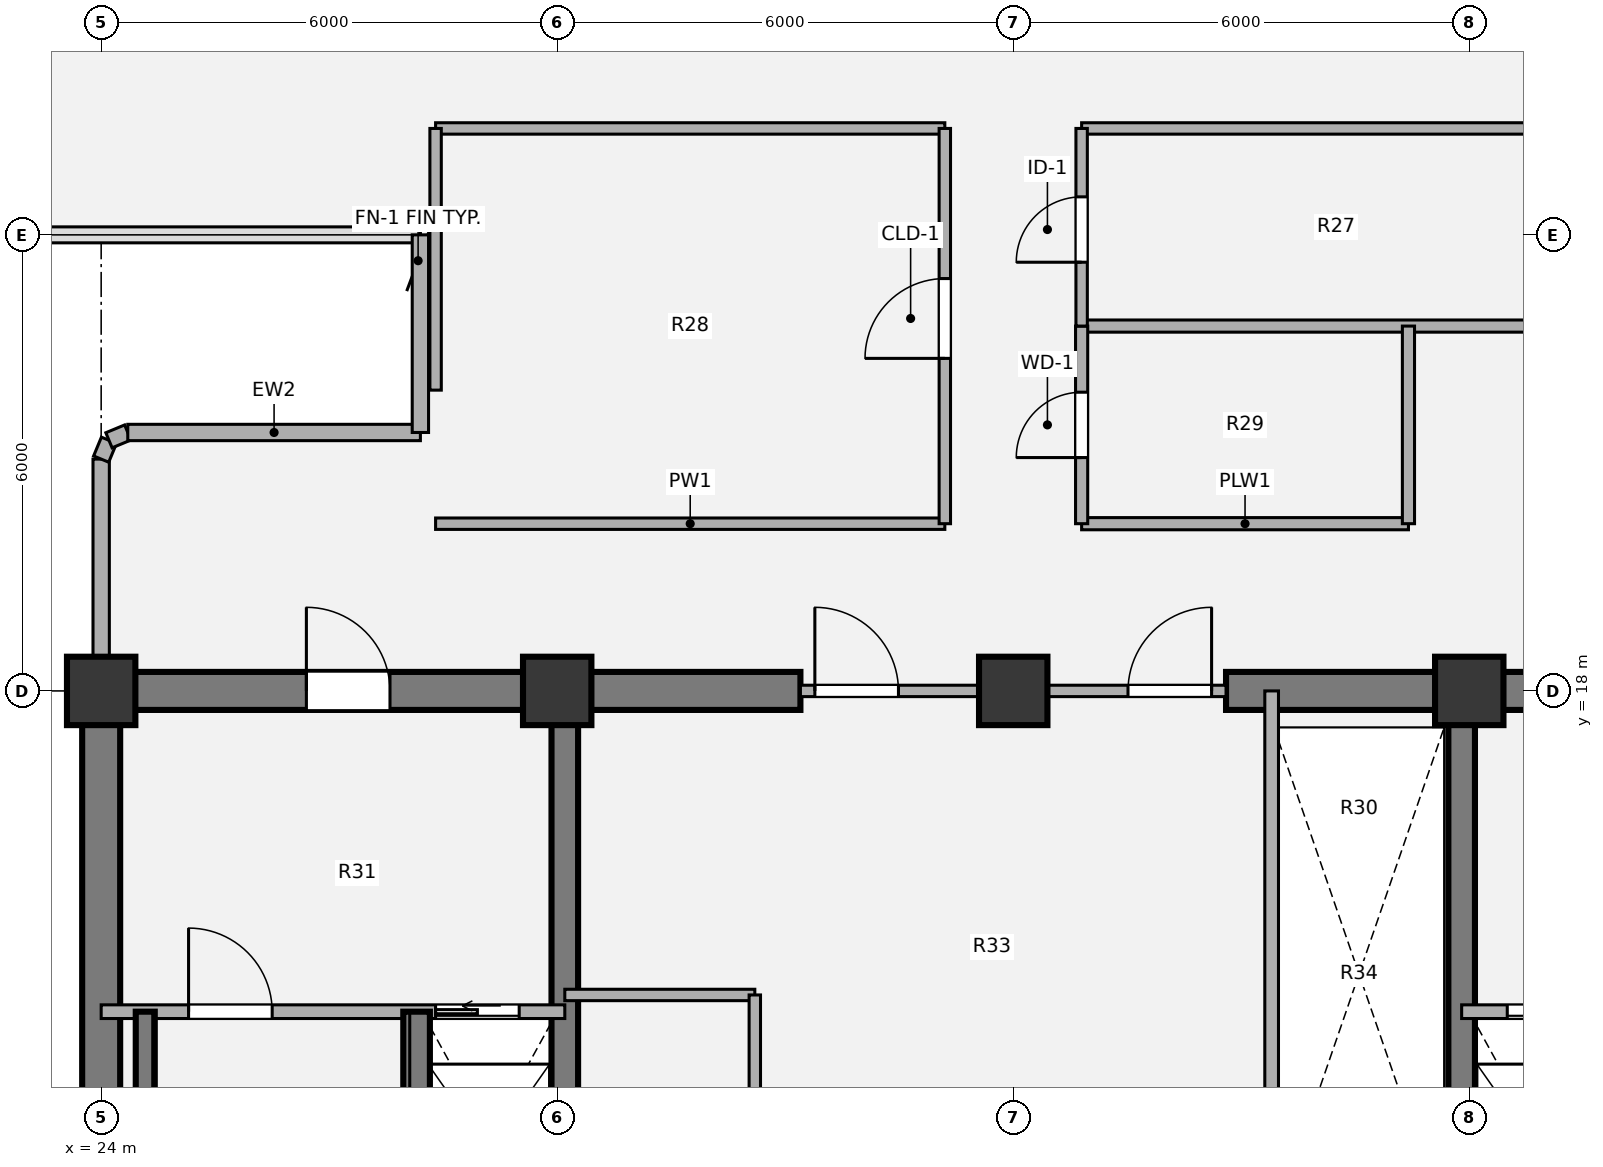
"""IFC4 building model, lengths in metres.
Left out: names, types, materials, properties, quantities, classifications, styles, units other than length and angle.
Written with IfcOpenShell. Run it as: python <this file> out.ifc"""

import sys

from ifc_helpers import new_model, si_unit, direction, frame, frame_2d, origin, origin_2d, place, context, subcontext, project, spatial, rectangle, extrude, source, transform, mapped, element, fill, save


model = new_model("IFC4")
c1 = context("Model", 3, precision=1e-05, world=origin(), true_north=direction((0.0, 1.0)))
c2 = subcontext(c1, "Body", "Model", "MODEL_VIEW")
j1 = project(units=[si_unit("LENGTHUNIT", "METRE"), si_unit("PLANEANGLEUNIT", "RADIAN")], contexts=[c1])
p1 = place(None, origin())
s1 = spatial("IfcSite", under=j1, at=p1, CompositionType="ELEMENT")
p2 = place(p1, origin())
s2 = spatial("IfcBuilding", under=s1, at=p2, CompositionType="ELEMENT")
p3 = place(p2, frame((0.0, 0.0, 131.4)))
s3 = spatial("IfcBuildingStorey", under=s2, at=p3, CompositionType="ELEMENT", Elevation=131.4)
m1 = source(origin(), c2, "Body", "SweptSolid", [
    extrude(rectangle(XDim=0.9, YDim=0.9, at=origin_2d()), origin(), (0.0, 0.0, 1.0), 3.78),
])
for number, where, z_axis, x_axis in (
    (1, (24.0, 18.0, 0.0), (0.0, 0.0, 1.0), (1.0, 0.0, 0.0)),
    (2, (30.0, 18.0, 0.0), (0.0, 0.0, 1.0), (1.0, 0.0, 0.0)),
    (3, (36.0, 18.0, 0.0), (0.0, 0.0, 1.0), (1.0, 0.0, 0.0)),
    (4, (42.0, 18.0, 0.0), (0.0, 0.0, 1.0), (1.0, 0.0, 0.0)),
):
    element("IfcColumn", number, at=place(p3, frame(where, z_axis=z_axis, x_axis=x_axis)), inside=s3, PredefinedType="COLUMN", context=c2, shape_type="MappedRepresentation", body=[
        mapped(m1, transform((0.0, 0.0, 0.0), x_axis=(1.0, 0.0, 0.0), y_axis=(0.0, 1.0, 0.0), z_axis=(0.0, 0.0, 1.0), scale=1.0)),
    ])
p4 = place(p3, frame((24.0, 6.0, 0.0), z_axis=(0.0, 0.0, 1.0), x_axis=(0.0, 1.0, 0.0)))
e5 = element("IfcWall", 5, at=p4, inside=s3, PredefinedType="SHEAR", context=c2, shape_type="SweptSolid", body=[
    extrude(rectangle(XDim=12.0, YDim=0.5, at=frame_2d((6.0, 0.0))), origin(), (0.0, 0.0, 1.0), 3.78),
])
p5 = place(p3, frame((23.75, 18.0, 0.0), z_axis=(0.0, 0.0, 1.0), x_axis=(1.0, 0.0, 0.0)))
e6 = element("IfcWall", 6, at=p5, inside=s3, PredefinedType="SHEAR", context=c2, shape_type="SweptSolid", body=[
    extrude(rectangle(XDim=9.45, YDim=0.5, at=frame_2d((4.725, 0.0))), origin(), (0.0, 0.0, 1.0), 3.78),
])
p6 = place(p5, frame((2.95, 0.0, 0.0)))
e7 = element("IfcOpeningElement", 7, at=p6, cuts=e6, PredefinedType="OPENING", context=c2, shape_type="SweptSolid", body=[
    extrude(rectangle(XDim=1.1, YDim=2.1, at=origin_2d()), frame((0.55, 0.26, 1.05), z_axis=(0.0, -1.0, 0.0), x_axis=(1.0, 0.0, 0.0)), (0.0, 0.0, 1.0), 0.52),
])
p7 = place(p3, frame((38.8, 18.0, 0.0), z_axis=(0.0, 0.0, 1.0), x_axis=(1.0, 0.0, 0.0)))
e8 = element("IfcWall", 8, at=p7, inside=s3, PredefinedType="SHEAR", context=c2, shape_type="SweptSolid", body=[
    extrude(rectangle(XDim=9.45, YDim=0.5, at=frame_2d((4.725, 0.0))), origin(), (0.0, 0.0, 1.0), 3.78),
])
p8 = place(p7, frame((5.45, 0.0, 0.0)))
e9 = element("IfcOpeningElement", 9, at=p8, cuts=e8, PredefinedType="OPENING", context=c2, shape_type="SweptSolid", body=[
    extrude(rectangle(XDim=1.1, YDim=2.1, at=origin_2d()), frame((0.55, 0.26, 1.05), z_axis=(0.0, -1.0, 0.0), x_axis=(1.0, 0.0, 0.0)), (0.0, 0.0, 1.0), 0.52),
])
p9 = place(p3, frame((30.1, 6.0, 0.0), z_axis=(0.0, 0.0, 1.0), x_axis=(0.0, 1.0, 0.0)))
e10 = element("IfcWall", 10, at=p9, inside=s3, PredefinedType="SHEAR", context=c2, shape_type="SweptSolid", body=[
    extrude(rectangle(XDim=12.0, YDim=0.35, at=frame_2d((6.0, 0.0))), origin(), (0.0, 0.0, 1.0), 3.78),
])
p10 = place(p3, frame((41.9, 18.0, 0.0), z_axis=(0.0, 0.0, 1.0), x_axis=(0.0, -1.0, 0.0)))
e11 = element("IfcWall", 11, at=p10, inside=s3, PredefinedType="SHEAR", context=c2, shape_type="SweptSolid", body=[
    extrude(rectangle(XDim=12.0, YDim=0.35, at=frame_2d((6.0, 0.0))), origin(), (0.0, 0.0, 1.0), 3.78),
])
p11 = place(p10, frame((10.08, 0.0, 0.0)))
e12 = element("IfcOpeningElement", 12, at=p11, cuts=e11, PredefinedType="OPENING", context=c2, shape_type="SweptSolid", body=[
    extrude(rectangle(XDim=1.3, YDim=2.1, at=origin_2d()), frame((0.65, 0.185, 1.05), z_axis=(0.0, -1.0, 0.0), x_axis=(1.0, 0.0, 0.0)), (0.0, 0.0, 1.0), 0.37),
])
p12 = place(p3, frame((24.0, 18.43, 0.0), z_axis=(0.0, 0.0, 1.0), x_axis=(0.0, 1.0, 0.0)))
e13 = element("IfcWall", 13, at=p12, inside=s3, PredefinedType="SOLIDWALL", context=c2, shape_type="SweptSolid", body=[
    extrude(rectangle(XDim=2.62, YDim=0.215, at=frame_2d((1.31, 0.0))), origin(), (0.0, 0.0, 1.0), 3.53),
])
p13 = place(p3, frame((24.0, 21.05, 0.0), z_axis=(0.0, 0.0, 1.0), x_axis=(0.382673670509, 0.923883575944, 0.0)))
e14 = element("IfcWall", 14, at=p13, inside=s3, PredefinedType="SOLIDWALL", context=c2, shape_type="SweptSolid", body=[
    extrude(rectangle(XDim=0.268, YDim=0.215, at=frame_2d((0.134, 0.0))), origin(), (0.0, 0.0, 1.0), 3.53),
])
p14 = place(p3, frame((24.103, 21.298, 0.0), z_axis=(0.0, 0.0, 1.0), x_axis=(0.924205486139, 0.381895560841, 0.0)))
e15 = element("IfcWall", 15, at=p14, inside=s3, PredefinedType="SOLIDWALL", context=c2, shape_type="SweptSolid", body=[
    extrude(rectangle(XDim=0.268, YDim=0.215, at=frame_2d((0.134, 0.0))), origin(), (0.0, 0.0, 1.0), 3.53),
])
p15 = place(p3, frame((24.35, 21.4, 0.0), z_axis=(0.0, 0.0, 1.0), x_axis=(1.0, 0.0, 0.0)))
e16 = element("IfcWall", 16, at=p15, inside=s3, PredefinedType="SOLIDWALL", context=c2, shape_type="SweptSolid", body=[
    extrude(rectangle(XDim=3.85, YDim=0.215, at=frame_2d((1.925, 0.0))), origin(), (0.0, 0.0, 1.0), 3.53),
])
p16 = place(p3, frame((28.2, 21.4, 0.0), z_axis=(0.0, 0.0, 1.0), x_axis=(0.0, 1.0, 0.0)))
e17 = element("IfcWall", 17, at=p16, inside=s3, PredefinedType="SOLIDWALL", context=c2, shape_type="SweptSolid", body=[
    extrude(rectangle(XDim=2.6, YDim=0.215, at=frame_2d((1.3, 0.0))), origin(), (0.0, 0.0, 1.0), 3.53),
])
p17 = place(p3, frame((30.1, 14.0, 0.0), z_axis=(0.0, 0.0, 1.0), x_axis=(1.0, 0.0, 0.0)))
e18 = element("IfcWall", 18, at=p17, inside=s3, PredefinedType="PARTITIONING", context=c2, shape_type="SweptSolid", body=[
    extrude(rectangle(XDim=2.5, YDim=0.15, at=frame_2d((1.25, 0.0))), origin(), (0.0, 0.0, 1.0), 3.5),
])
p18 = place(p3, frame((39.4, 11.0, 0.0), z_axis=(0.0, 0.0, 1.0), x_axis=(0.0, 1.0, 0.0)))
e19 = element("IfcWall", 19, at=p18, inside=s3, PredefinedType="PARTITIONING", context=c2, shape_type="SweptSolid", body=[
    extrude(rectangle(XDim=7.0, YDim=0.18, at=frame_2d((3.5, 0.0))), origin(), (0.0, 0.0, 1.0), 3.5),
])
p19 = place(p3, frame((32.6, 6.0, 0.0), z_axis=(0.0, 0.0, 1.0), x_axis=(0.0, 1.0, 0.0)))
e20 = element("IfcWall", 20, at=p19, inside=s3, PredefinedType="PARTITIONING", context=c2, shape_type="SweptSolid", body=[
    extrude(rectangle(XDim=8.0, YDim=0.15, at=frame_2d((4.0, 0.0))), origin(), (0.0, 0.0, 1.0), 3.5),
])
p20 = place(p19, frame((1.5, 0.0, 0.0)))
e21 = element("IfcOpeningElement", 21, at=p20, cuts=e20, PredefinedType="OPENING", context=c2, shape_type="SweptSolid", body=[
    extrude(rectangle(XDim=0.86, YDim=2.1, at=origin_2d()), frame((0.43, 0.085, 1.05), z_axis=(0.0, -1.0, 0.0), x_axis=(1.0, 0.0, 0.0)), (0.0, 0.0, 1.0), 0.17),
])
p21 = place(p19, frame((5.6, 0.0, 0.0)))
e22 = element("IfcOpeningElement", 22, at=p21, cuts=e20, PredefinedType="OPENING", context=c2, shape_type="SweptSolid", body=[
    extrude(rectangle(XDim=0.86, YDim=2.1, at=origin_2d()), frame((0.43, 0.085, 1.05), z_axis=(0.0, -1.0, 0.0), x_axis=(1.0, 0.0, 0.0)), (0.0, 0.0, 1.0), 0.17),
])
p22 = place(p3, frame((33.2, 18.0, 0.0), z_axis=(0.0, 0.0, 1.0), x_axis=(1.0, 0.0, 0.0)))
e23 = element("IfcWall", 23, at=p22, inside=s3, PredefinedType="PARTITIONING", context=c2, shape_type="SweptSolid", body=[
    extrude(rectangle(XDim=5.6, YDim=0.15, at=frame_2d((2.8, 0.0))), origin(), (0.0, 0.0, 1.0), 2.315),
])
p23 = place(p22, frame((0.19, 0.0, 0.0)))
e24 = element("IfcOpeningElement", 24, at=p23, cuts=e23, PredefinedType="OPENING", context=c2, shape_type="SweptSolid", body=[
    extrude(rectangle(XDim=1.1, YDim=2.1, at=origin_2d()), frame((0.55, 0.085, 1.05), z_axis=(0.0, -1.0, 0.0), x_axis=(1.0, 0.0, 0.0)), (0.0, 0.0, 1.0), 0.17),
])
p24 = place(p22, frame((4.31, 0.0, 0.0)))
e25 = element("IfcOpeningElement", 25, at=p24, cuts=e23, PredefinedType="OPENING", context=c2, shape_type="SweptSolid", body=[
    extrude(rectangle(XDim=1.1, YDim=2.1, at=origin_2d()), frame((0.55, 0.085, 1.05), z_axis=(0.0, -1.0, 0.0), x_axis=(1.0, 0.0, 0.0)), (0.0, 0.0, 1.0), 0.17),
])
p25 = place(p3, frame((24.0, 13.78, 0.0), z_axis=(0.0, 0.0, 1.0), x_axis=(1.0, 0.0, 0.0)))
e26 = element("IfcWall", 26, at=p25, inside=s3, PredefinedType="PARTITIONING", context=c2, shape_type="SweptSolid", body=[
    extrude(rectangle(XDim=6.1, YDim=0.18, at=frame_2d((3.05, 0.0))), origin(), (0.0, 0.0, 1.0), 3.5),
])
p26 = place(p25, frame((1.15, 0.0, 0.0)))
e27 = element("IfcOpeningElement", 27, at=p26, cuts=e26, PredefinedType="OPENING", context=c2, shape_type="SweptSolid", body=[
    extrude(rectangle(XDim=1.1, YDim=2.1, at=origin_2d()), frame((0.55, 0.1, 1.05), z_axis=(0.0, -1.0, 0.0), x_axis=(1.0, 0.0, 0.0)), (0.0, 0.0, 1.0), 0.2),
])
p27 = place(p25, frame((4.4, 0.0, 0.0)))
e28 = element("IfcOpeningElement", 28, at=p27, cuts=e26, PredefinedType="OPENING", context=c2, shape_type="SweptSolid", body=[
    extrude(rectangle(XDim=1.1, YDim=2.1, at=origin_2d()), frame((0.55, 0.1, 1.05), z_axis=(0.0, -1.0, 0.0), x_axis=(1.0, 0.0, 0.0)), (0.0, 0.0, 1.0), 0.2),
])
p28 = place(p3, frame((28.15, 6.0, 0.0), z_axis=(0.0, 0.0, 1.0), x_axis=(0.0, 1.0, 0.0)))
e29 = element("IfcWall", 29, at=p28, inside=s3, PredefinedType="SHEAR", context=c2, shape_type="SweptSolid", body=[
    extrude(rectangle(XDim=7.78, YDim=0.35, at=frame_2d((3.89, 0.0))), origin(), (0.0, 0.0, 1.0), 3.85),
])
p29 = place(p3, frame((24.58, 6.0, 0.0), z_axis=(0.0, 0.0, 1.0), x_axis=(0.0, 1.0, 0.0)))
e30 = element("IfcWall", 30, at=p29, inside=s3, PredefinedType="SHEAR", context=c2, shape_type="SweptSolid", body=[
    extrude(rectangle(XDim=7.78, YDim=0.25, at=frame_2d((3.89, 0.0))), origin(), (0.0, 0.0, 1.0), 3.85),
])
p30 = place(p3, frame((41.9, 13.78, 0.0), z_axis=(0.0, 0.0, 1.0), x_axis=(1.0, 0.0, 0.0)))
e31 = element("IfcWall", 31, at=p30, inside=s3, PredefinedType="PARTITIONING", context=c2, shape_type="SweptSolid", body=[
    extrude(rectangle(XDim=6.1, YDim=0.18, at=frame_2d((3.05, 0.0))), origin(), (0.0, 0.0, 1.0), 3.5),
])
p31 = place(p30, frame((0.6, 0.0, 0.0)))
e32 = element("IfcOpeningElement", 32, at=p31, cuts=e31, PredefinedType="OPENING", context=c2, shape_type="SweptSolid", body=[
    extrude(rectangle(XDim=1.1, YDim=2.1, at=origin_2d()), frame((0.55, 0.1, 1.05), z_axis=(0.0, -1.0, 0.0), x_axis=(1.0, 0.0, 0.0)), (0.0, 0.0, 1.0), 0.2),
])
p32 = place(p30, frame((3.8, 0.0, 0.0)))
e33 = element("IfcOpeningElement", 33, at=p32, cuts=e31, PredefinedType="OPENING", context=c2, shape_type="SweptSolid", body=[
    extrude(rectangle(XDim=1.1, YDim=2.1, at=origin_2d()), frame((0.55, 0.1, 1.05), z_axis=(0.0, -1.0, 0.0), x_axis=(1.0, 0.0, 0.0)), (0.0, 0.0, 1.0), 0.2),
])
p33 = place(p3, frame((28.4, 20.2, 0.0), z_axis=(0.0, 0.0, 1.0), x_axis=(1.0, 0.0, 0.0)))
e34 = element("IfcWall", 34, at=p33, inside=s3, PredefinedType="PARTITIONING", context=c2, shape_type="SweptSolid", body=[
    extrude(rectangle(XDim=6.7, YDim=0.15, at=frame_2d((3.35, 0.0))), origin(), (0.0, 0.0, 1.0), 3.5),
])
p34 = place(p3, frame((36.9, 20.2, 0.0), z_axis=(0.0, 0.0, 1.0), x_axis=(1.0, 0.0, 0.0)))
e35 = element("IfcWall", 35, at=p34, inside=s3, PredefinedType="PLUMBINGWALL", context=c2, shape_type="SweptSolid", body=[
    extrude(rectangle(XDim=4.3, YDim=0.16, at=frame_2d((2.15, 0.0))), origin(), (0.0, 0.0, 1.0), 3.5),
])
p35 = place(p3, frame((36.9, 22.8, 0.0), z_axis=(0.0, 0.0, 1.0), x_axis=(1.0, 0.0, 0.0)))
e36 = element("IfcWall", 36, at=p35, inside=s3, PredefinedType="PLUMBINGWALL", context=c2, shape_type="SweptSolid", body=[
    extrude(rectangle(XDim=6.82, YDim=0.16, at=frame_2d((3.41, 0.0))), origin(), (0.0, 0.0, 1.0), 3.5),
])
for number, where, z_axis, x_axis in (
    (37, (28.4, 25.4, 0.0), (0.0, 0.0, 1.0), (1.0, 0.0, 0.0)),
    (38, (36.9, 25.4, 0.0), (0.0, 0.0, 1.0), (1.0, 0.0, 0.0)),
):
    element("IfcWall", number, at=place(p3, frame(where, z_axis=z_axis, x_axis=x_axis)), inside=s3, PredefinedType="PARTITIONING", context=c2, shape_type="SweptSolid", body=[
        extrude(rectangle(XDim=6.7, YDim=0.15, at=frame_2d((3.35, 0.0))), origin(), (0.0, 0.0, 1.0), 3.5),
    ])
p36 = place(p3, frame((28.4, 21.957, 0.0), z_axis=(0.0, 0.0, 1.0), x_axis=(0.0, 1.0, 0.0)))
e39 = element("IfcWall", 39, at=p36, inside=s3, PredefinedType="PARTITIONING", context=c2, shape_type="SweptSolid", body=[
    extrude(rectangle(XDim=3.443, YDim=0.15, at=frame_2d((1.721, 0.0))), origin(), (0.0, 0.0, 1.0), 3.5),
])
p37 = place(p3, frame((35.1, 20.2, 0.0), z_axis=(0.0, 0.0, 1.0), x_axis=(0.0, 1.0, 0.0)))
e40 = element("IfcWall", 40, at=p37, inside=s3, PredefinedType="PARTITIONING", context=c2, shape_type="SweptSolid", body=[
    extrude(rectangle(XDim=5.2, YDim=0.15, at=frame_2d((2.6, 0.0))), origin(), (0.0, 0.0, 1.0), 3.5),
])
p38 = place(p37, frame((2.175, 0.0, 0.0)))
e41 = element("IfcOpeningElement", 41, at=p38, cuts=e40, PredefinedType="OPENING", context=c2, shape_type="SweptSolid", body=[
    extrude(rectangle(XDim=1.05, YDim=2.1, at=origin_2d()), frame((0.525, 0.085, 1.05), z_axis=(0.0, -1.0, 0.0), x_axis=(1.0, 0.0, 0.0)), (0.0, 0.0, 1.0), 0.17),
])
p39 = place(p3, frame((36.9, 20.2, 0.0), z_axis=(0.0, 0.0, 1.0), x_axis=(0.0, 1.0, 0.0)))
e42 = element("IfcWall", 42, at=p39, inside=s3, PredefinedType="PLUMBINGWALL", context=c2, shape_type="SweptSolid", body=[
    extrude(rectangle(XDim=2.6, YDim=0.16, at=frame_2d((1.3, 0.0))), origin(), (0.0, 0.0, 1.0), 3.5),
])
p40 = place(p39, frame((0.87, 0.0, 0.0)))
e43 = element("IfcOpeningElement", 43, at=p40, cuts=e42, PredefinedType="OPENING", context=c2, shape_type="SweptSolid", body=[
    extrude(rectangle(XDim=0.86, YDim=2.1, at=origin_2d()), frame((0.43, 0.09, 1.05), z_axis=(0.0, -1.0, 0.0), x_axis=(1.0, 0.0, 0.0)), (0.0, 0.0, 1.0), 0.18),
])
p41 = place(p3, frame((36.9, 22.8, 0.0), z_axis=(0.0, 0.0, 1.0), x_axis=(0.0, 1.0, 0.0)))
e44 = element("IfcWall", 44, at=p41, inside=s3, PredefinedType="PARTITIONING", context=c2, shape_type="SweptSolid", body=[
    extrude(rectangle(XDim=2.6, YDim=0.15, at=frame_2d((1.3, 0.0))), origin(), (0.0, 0.0, 1.0), 3.5),
])
p42 = place(p41, frame((0.84, 0.0, 0.0)))
e45 = element("IfcOpeningElement", 45, at=p42, cuts=e44, PredefinedType="OPENING", context=c2, shape_type="SweptSolid", body=[
    extrude(rectangle(XDim=0.86, YDim=2.1, at=origin_2d()), frame((0.43, 0.085, 1.05), z_axis=(0.0, -1.0, 0.0), x_axis=(1.0, 0.0, 0.0)), (0.0, 0.0, 1.0), 0.17),
])
p43 = place(p3, frame((41.2, 20.2, 0.0), z_axis=(0.0, 0.0, 1.0), x_axis=(0.0, 1.0, 0.0)))
e46 = element("IfcWall", 46, at=p43, inside=s3, PredefinedType="PLUMBINGWALL", context=c2, shape_type="SweptSolid", body=[
    extrude(rectangle(XDim=2.6, YDim=0.16, at=frame_2d((1.3, 0.0))), origin(), (0.0, 0.0, 1.0), 2.815),
])
m2 = source(origin(), c2, "Body", "SweptSolid", [
    extrude(rectangle(XDim=1.1, YDim=2.1, at=origin_2d()), frame((0.55, 0.025, 1.05), z_axis=(0.0, -1.0, 0.0), x_axis=(1.0, 0.0, 0.0)), (0.0, 0.0, 1.0), 0.05),
])
p44 = place(p23, origin())
e47 = element("IfcDoor", 47, at=p44, inside=s3, OperationType="SINGLE_SWING_LEFT", PredefinedType="DOOR", context=c2, shape_type="MappedRepresentation", body=[
    mapped(m2, transform((0.0, 0.0, 0.0), x_axis=(1.0, 0.0, 0.0), y_axis=(0.0, 1.0, 0.0), z_axis=(0.0, 0.0, 1.0), scale=1.0)),
])
fill(e24, e47)
p45 = place(p24, origin())
e48 = element("IfcDoor", 48, at=p45, inside=s3, OperationType="SINGLE_SWING_RIGHT", PredefinedType="DOOR", context=c2, shape_type="MappedRepresentation", body=[
    mapped(m2, transform((0.0, 0.0, 0.0), x_axis=(1.0, 0.0, 0.0), y_axis=(0.0, 1.0, 0.0), z_axis=(0.0, 0.0, 1.0), scale=1.0)),
])
fill(e25, e48)
m3 = source(origin(), c2, "Body", "SweptSolid", [
    extrude(rectangle(XDim=1.1, YDim=2.1, at=origin_2d()), frame((0.55, 0.025, 1.05), z_axis=(0.0, -1.0, 0.0), x_axis=(1.0, 0.0, 0.0)), (0.0, 0.0, 1.0), 0.05),
])
p46 = place(p26, origin())
e49 = element("IfcDoor", 49, at=p46, inside=s3, OperationType="SINGLE_SWING_LEFT", PredefinedType="DOOR", context=c2, shape_type="MappedRepresentation", body=[
    mapped(m3, transform((0.0, 0.0, 0.0), x_axis=(1.0, 0.0, 0.0), y_axis=(0.0, 1.0, 0.0), z_axis=(0.0, 0.0, 1.0), scale=1.0)),
])
fill(e27, e49)
m4 = source(origin(), c2, "Body", "SweptSolid", [
    extrude(rectangle(XDim=1.1, YDim=2.1, at=origin_2d()), frame((0.55, 0.025, 1.05), z_axis=(0.0, -1.0, 0.0), x_axis=(1.0, 0.0, 0.0)), (0.0, 0.0, 1.0), 0.05),
])
p47 = place(p27, origin())
e50 = element("IfcDoor", 50, at=p47, inside=s3, OperationType="SLIDING_TO_LEFT", PredefinedType="DOOR", context=c2, shape_type="MappedRepresentation", body=[
    mapped(m4, transform((0.0, 0.0, 0.0), x_axis=(1.0, 0.0, 0.0), y_axis=(0.0, 1.0, 0.0), z_axis=(0.0, 0.0, 1.0), scale=1.0)),
])
fill(e28, e50)
p48 = place(p31, origin())
e51 = element("IfcDoor", 51, at=p48, inside=s3, OperationType="SLIDING_TO_RIGHT", PredefinedType="DOOR", context=c2, shape_type="MappedRepresentation", body=[
    mapped(m4, transform((0.0, 0.0, 0.0), x_axis=(1.0, 0.0, 0.0), y_axis=(0.0, 1.0, 0.0), z_axis=(0.0, 0.0, 1.0), scale=1.0)),
])
fill(e32, e51)
p49 = place(p6, origin())
e52 = element("IfcDoor", 52, at=p49, inside=s3, OperationType="SINGLE_SWING_LEFT", PredefinedType="DOOR", context=c2, shape_type="MappedRepresentation", body=[
    mapped(m2, transform((0.0, 0.0, 0.0), x_axis=(1.0, 0.0, 0.0), y_axis=(0.0, 1.0, 0.0), z_axis=(0.0, 0.0, 1.0), scale=1.0)),
])
fill(e7, e52)
m5 = source(origin(), c2, "Body", "SweptSolid", [
    extrude(rectangle(XDim=1.05, YDim=2.1, at=origin_2d()), frame((0.525, 0.025, 1.05), z_axis=(0.0, -1.0, 0.0), x_axis=(1.0, 0.0, 0.0)), (0.0, 0.0, 1.0), 0.05),
])
p50 = place(p38, origin())
e53 = element("IfcDoor", 53, at=p50, inside=s3, OperationType="SINGLE_SWING_LEFT", PredefinedType="DOOR", context=c2, shape_type="MappedRepresentation", body=[
    mapped(m5, transform((0.0, 0.0, 0.0), x_axis=(1.0, 0.0, 0.0), y_axis=(0.0, 1.0, 0.0), z_axis=(0.0, 0.0, 1.0), scale=1.0)),
])
fill(e41, e53)
m6 = source(origin(), c2, "Body", "SweptSolid", [
    extrude(rectangle(XDim=0.86, YDim=2.1, at=origin_2d()), frame((0.43, 0.025, 1.05), z_axis=(0.0, -1.0, 0.0), x_axis=(1.0, 0.0, 0.0)), (0.0, 0.0, 1.0), 0.05),
])
p51 = place(p40, origin())
e54 = element("IfcDoor", 54, at=p51, inside=s3, OperationType="SINGLE_SWING_LEFT", PredefinedType="DOOR", context=c2, shape_type="MappedRepresentation", body=[
    mapped(m6, transform((0.0, 0.0, 0.0), x_axis=(1.0, 0.0, 0.0), y_axis=(0.0, 1.0, 0.0), z_axis=(0.0, 0.0, 1.0), scale=1.0)),
])
fill(e43, e54)
m7 = source(origin(), c2, "Body", "SweptSolid", [
    extrude(rectangle(XDim=0.86, YDim=2.1, at=origin_2d()), frame((0.43, 0.025, 1.05), z_axis=(0.0, -1.0, 0.0), x_axis=(1.0, 0.0, 0.0)), (0.0, 0.0, 1.0), 0.05),
])
p52 = place(p42, origin())
e55 = element("IfcDoor", 55, at=p52, inside=s3, OperationType="SINGLE_SWING_LEFT", PredefinedType="DOOR", context=c2, shape_type="MappedRepresentation", body=[
    mapped(m7, transform((0.0, 0.0, 0.0), x_axis=(1.0, 0.0, 0.0), y_axis=(0.0, 1.0, 0.0), z_axis=(0.0, 0.0, 1.0), scale=1.0)),
])
fill(e45, e55)
save(model, sys.argv[1])
